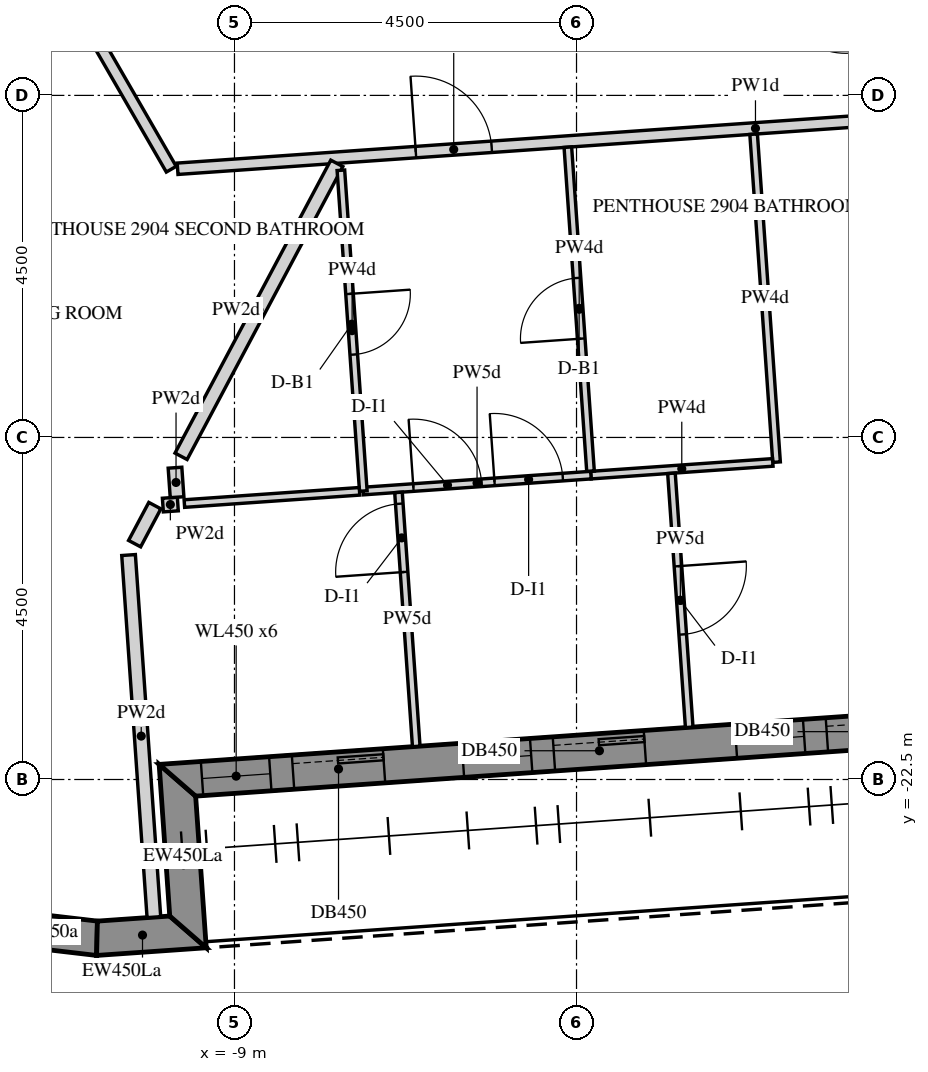
"""IFC4 building model, lengths in metres.
Left out: names, types, materials, properties, quantities, classifications, styles, units other than length and angle.
Written with IfcOpenShell. Run it as: python <this file> out.ifc"""

import sys

from ifc_helpers import new_model, si_unit, direction, frame, frame_2d, origin, place, context, subcontext, project, spatial, polyline, rectangle, outline, extrude, element, fill, save


model = new_model("IFC4")
c1 = context("Model", 3, precision=1e-05, world=origin(), true_north=direction((0.0, 1.0)))
c2 = subcontext(c1, "Body", "Model", "MODEL_VIEW")
j1 = project(units=[si_unit("LENGTHUNIT", "METRE"), si_unit("PLANEANGLEUNIT", "RADIAN")], contexts=[c1])
p1 = place(None, origin())
s1 = spatial("IfcSite", under=j1, at=p1, CompositionType="ELEMENT")
p2 = place(p1, origin())
s2 = spatial("IfcBuilding", under=s1, at=p2, CompositionType="ELEMENT")
p3 = place(p2, frame((0.0, 0.0, 372.9)))
s3 = spatial("IfcBuildingStorey", under=s2, at=p3, CompositionType="ELEMENT", Elevation=372.9)
p4 = place(p3, frame((-12.197, -24.427, -0.15), z_axis=(0.0, 0.0, 1.0), x_axis=(0.993227902261, -0.116182331575, 0.0)))
e1 = element("IfcWall", 1, at=p4, inside=s3, PredefinedType="SOLIDWALL", context=c2, shape_type="SweptSolid", body=[
    extrude(outline(polyline([(-0.042, -0.225), (1.418, -0.225), (1.376, 0.225), (0.042, 0.225), (-0.042, -0.225)])), origin(), (0.0, 0.0, 1.0), 3.55),
])
p5 = place(p3, frame((-10.809, -24.589, -0.15), z_axis=(0.0, 0.0, 1.0), x_axis=(0.997562933087, 0.069772448216, 0.0)))
e2 = element("IfcWall", 2, at=p5, inside=s3, PredefinedType="SOLIDWALL", context=c2, shape_type="SweptSolid", body=[
    extrude(outline(polyline([(-0.021, -0.225), (1.425, -0.225), (0.975, 0.225), (0.021, 0.225), (-0.021, -0.225)])), origin(), (0.0, 0.0, 1.0), 3.55),
])
p6 = place(p3, frame((-9.611, -24.505, -0.15), z_axis=(0.0, 0.0, 1.0), x_axis=(-0.069824268692, 0.99755930726, 0.0)))
e3 = element("IfcWall", 3, at=p6, inside=s3, PredefinedType="SOLIDWALL", context=c2, shape_type="SweptSolid", body=[
    extrude(outline(polyline([(-0.225, -0.225), (1.775, -0.225), (2.225, 0.225), (0.225, 0.225), (-0.225, -0.225)])), origin(), (0.0, 0.0, 1.0), 3.55),
])
p7 = place(p3, frame((-9.751, -22.51, -0.15), z_axis=(0.0, 0.0, 1.0), x_axis=(0.997564460173, 0.06975061147, 0.0)))
e4 = element("IfcWall", 4, at=p7, inside=s3, PredefinedType="SOLIDWALL", context=c2, shape_type="SweptSolid", body=[
    extrude(outline(polyline([(0.225, -0.225), (20.507, -0.225), (20.957, 0.225), (-0.225, 0.225), (0.225, -0.225)])), origin(), (0.0, 0.0, 1.0), 3.55),
])
p8 = place(p7, frame((0.325, 0.0, 1.05)))
e5 = element("IfcOpeningElement", 5, at=p8, cuts=e4, PredefinedType="OPENING", context=c2, shape_type="SweptSolid", body=[
    extrude(rectangle(XDim=0.9, YDim=1.5, at=frame_2d((0.45, 0.75))), frame((0.0, 0.235, 0.0), z_axis=(0.0, -1.0, 0.0), x_axis=(1.0, 0.0, 0.0)), (0.0, 0.0, 1.0), 0.47),
])
p9 = place(p7, frame((1.525, 0.0, 0.15)))
e6 = element("IfcOpeningElement", 6, at=p9, cuts=e4, PredefinedType="OPENING", context=c2, shape_type="SweptSolid", body=[
    extrude(rectangle(XDim=1.2, YDim=2.4, at=frame_2d((0.6, 1.2))), frame((0.0, 0.235, 0.0), z_axis=(0.0, -1.0, 0.0), x_axis=(1.0, 0.0, 0.0)), (0.0, 0.0, 1.0), 0.47),
])
p10 = place(p7, frame((3.766, 0.0, 1.05)))
e7 = element("IfcOpeningElement", 7, at=p10, cuts=e4, PredefinedType="OPENING", context=c2, shape_type="SweptSolid", body=[
    extrude(rectangle(XDim=0.9, YDim=1.5, at=frame_2d((0.45, 0.75))), frame((0.0, 0.235, 0.0), z_axis=(0.0, -1.0, 0.0), x_axis=(1.0, 0.0, 0.0)), (0.0, 0.0, 1.0), 0.47),
])
p11 = place(p7, frame((4.966, 0.0, 0.15)))
e8 = element("IfcOpeningElement", 8, at=p11, cuts=e4, PredefinedType="OPENING", context=c2, shape_type="SweptSolid", body=[
    extrude(rectangle(XDim=1.2, YDim=2.4, at=frame_2d((0.6, 1.2))), frame((0.0, 0.235, 0.0), z_axis=(0.0, -1.0, 0.0), x_axis=(1.0, 0.0, 0.0)), (0.0, 0.0, 1.0), 0.47),
])
p12 = place(p7, frame((7.366, 0.0, 1.05)))
e9 = element("IfcOpeningElement", 9, at=p12, cuts=e4, PredefinedType="OPENING", context=c2, shape_type="SweptSolid", body=[
    extrude(rectangle(XDim=0.9, YDim=1.5, at=frame_2d((0.45, 0.75))), frame((0.0, 0.235, 0.0), z_axis=(0.0, -1.0, 0.0), x_axis=(1.0, 0.0, 0.0)), (0.0, 0.0, 1.0), 0.47),
])
p13 = place(p7, frame((8.566, 0.0, 0.15)))
e10 = element("IfcOpeningElement", 10, at=p13, cuts=e4, PredefinedType="OPENING", context=c2, shape_type="SweptSolid", body=[
    extrude(rectangle(XDim=1.2, YDim=2.4, at=frame_2d((0.6, 1.2))), frame((0.0, 0.235, 0.0), z_axis=(0.0, -1.0, 0.0), x_axis=(1.0, 0.0, 0.0)), (0.0, 0.0, 1.0), 0.47),
])
p14 = place(p7, frame((10.966, 0.0, 1.05)))
e11 = element("IfcOpeningElement", 11, at=p14, cuts=e4, PredefinedType="OPENING", context=c2, shape_type="SweptSolid", body=[
    extrude(rectangle(XDim=0.9, YDim=1.5, at=frame_2d((0.45, 0.75))), frame((0.0, 0.235, 0.0), z_axis=(0.0, -1.0, 0.0), x_axis=(1.0, 0.0, 0.0)), (0.0, 0.0, 1.0), 0.47),
])
p15 = place(p7, frame((12.166, 0.0, 0.15)))
e12 = element("IfcOpeningElement", 12, at=p15, cuts=e4, PredefinedType="OPENING", context=c2, shape_type="SweptSolid", body=[
    extrude(rectangle(XDim=1.2, YDim=2.4, at=frame_2d((0.6, 1.2))), frame((0.0, 0.235, 0.0), z_axis=(0.0, -1.0, 0.0), x_axis=(1.0, 0.0, 0.0)), (0.0, 0.0, 1.0), 0.47),
])
p16 = place(p7, frame((14.566, 0.0, 1.05)))
e13 = element("IfcOpeningElement", 13, at=p16, cuts=e4, PredefinedType="OPENING", context=c2, shape_type="SweptSolid", body=[
    extrude(rectangle(XDim=0.9, YDim=1.5, at=frame_2d((0.45, 0.75))), frame((0.0, 0.235, 0.0), z_axis=(0.0, -1.0, 0.0), x_axis=(1.0, 0.0, 0.0)), (0.0, 0.0, 1.0), 0.47),
])
p17 = place(p7, frame((15.766, 0.0, 0.15)))
e14 = element("IfcOpeningElement", 14, at=p17, cuts=e4, PredefinedType="OPENING", context=c2, shape_type="SweptSolid", body=[
    extrude(rectangle(XDim=1.2, YDim=2.4, at=frame_2d((0.6, 1.2))), frame((0.0, 0.235, 0.0), z_axis=(0.0, -1.0, 0.0), x_axis=(1.0, 0.0, 0.0)), (0.0, 0.0, 1.0), 0.47),
])
p18 = place(p7, frame((18.007, 0.0, 1.05)))
e15 = element("IfcOpeningElement", 15, at=p18, cuts=e4, PredefinedType="OPENING", context=c2, shape_type="SweptSolid", body=[
    extrude(rectangle(XDim=0.9, YDim=1.5, at=frame_2d((0.45, 0.75))), frame((0.0, 0.235, 0.0), z_axis=(0.0, -1.0, 0.0), x_axis=(1.0, 0.0, 0.0)), (0.0, 0.0, 1.0), 0.47),
])
p19 = place(p7, frame((19.207, 0.0, 0.15)))
e16 = element("IfcOpeningElement", 16, at=p19, cuts=e4, PredefinedType="OPENING", context=c2, shape_type="SweptSolid", body=[
    extrude(rectangle(XDim=1.2, YDim=2.4, at=frame_2d((0.6, 1.2))), frame((0.0, 0.235, 0.0), z_axis=(0.0, -1.0, 0.0), x_axis=(1.0, 0.0, 0.0)), (0.0, 0.0, 1.0), 0.47),
])
p20 = place(p3, frame((-16.583, -2.777, 0.0), z_axis=(0.0, 0.0, 1.0), x_axis=(0.50000467473, -0.866022704811, 0.0)))
e17 = element("IfcWall", 17, at=p20, inside=s3, PredefinedType="PARTITIONING", context=c2, shape_type="SweptSolid", body=[
    extrude(rectangle(XDim=13.504, YDim=0.15, at=frame_2d((6.752, 0.0))), origin(), (0.0, 0.0, 1.0), 2.47),
])
p21 = place(p20, frame((0.925, 0.0, 0.0)))
e18 = element("IfcOpeningElement", 18, at=p21, cuts=e17, PredefinedType="OPENING", context=c2, shape_type="SweptSolid", body=[
    extrude(rectangle(XDim=1.0, YDim=2.1, at=frame_2d((0.5, 1.05))), frame((0.0, 0.085, 0.0), z_axis=(0.0, -1.0, 0.0), x_axis=(1.0, 0.0, 0.0)), (0.0, 0.0, 1.0), 0.17),
])
p22 = place(p3, frame((-9.749, -14.465, 0.0), z_axis=(0.0, 0.0, 1.0), x_axis=(0.997564252773, 0.069753577612, 0.0)))
e19 = element("IfcWall", 19, at=p22, inside=s3, PredefinedType="PARTITIONING", context=c2, shape_type="SweptSolid", body=[
    extrude(rectangle(XDim=15.243, YDim=0.15, at=frame_2d((7.621, 0.0))), origin(), (0.0, 0.0, 1.0), 2.47),
])
p23 = place(p22, frame((3.142, 0.0, 0.0)))
e20 = element("IfcOpeningElement", 20, at=p23, cuts=e19, PredefinedType="OPENING", context=c2, shape_type="SweptSolid", body=[
    extrude(rectangle(XDim=1.0, YDim=2.1, at=frame_2d((0.5, 1.05))), frame((0.0, 0.085, 0.0), z_axis=(0.0, -1.0, 0.0), x_axis=(1.0, 0.0, 0.0)), (0.0, 0.0, 1.0), 0.17),
])
p24 = place(p3, frame((-10.06, -24.311, 0.0), z_axis=(0.0, 0.0, 1.0), x_axis=(-0.069731958306, 0.997565764244, 0.0)))
e21 = element("IfcWall", 21, at=p24, inside=s3, PredefinedType="PARTITIONING", context=c2, shape_type="SweptSolid", body=[
    extrude(rectangle(XDim=4.776, YDim=0.18, at=frame_2d((2.388, 0.0))), origin(), (0.0, 0.0, 1.0), 2.47),
])
p25 = place(p3, frame((-10.314, -19.397, 0.0), z_axis=(0.0, 0.0, 1.0), x_axis=(0.469648701082, 0.882853383961, 0.0)))
e22 = element("IfcWall", 22, at=p25, inside=s3, PredefinedType="PARTITIONING", context=c2, shape_type="SweptSolid", body=[
    extrude(rectangle(XDim=0.567, YDim=0.18, at=frame_2d((0.283, 0.0))), origin(), (0.0, 0.0, 1.0), 2.47),
])
p26 = place(p3, frame((-9.942, -18.889, 0.0), z_axis=(0.0, 0.0, 1.0), x_axis=(0.997589087128, 0.069397501713, 0.0)))
e23 = element("IfcWall", 23, at=p26, inside=s3, PredefinedType="PARTITIONING", context=c2, shape_type="SweptSolid", body=[
    extrude(rectangle(XDim=0.197, YDim=0.18, at=frame_2d((0.099, 0.0))), origin(), (0.0, 0.0, 1.0), 2.47),
])
p27 = place(p3, frame((-9.755, -18.786, 0.0), z_axis=(0.0, 0.0, 1.0), x_axis=(-0.070266142985, 0.997528279875, 0.0)))
e24 = element("IfcWall", 24, at=p27, inside=s3, PredefinedType="PARTITIONING", context=c2, shape_type="SweptSolid", body=[
    extrude(rectangle(XDim=0.389, YDim=0.18, at=frame_2d((0.195, 0.0))), origin(), (0.0, 0.0, 1.0), 2.47),
])
p28 = place(p3, frame((-9.703, -18.248, 0.0), z_axis=(0.0, 0.0, 1.0), x_axis=(0.469490526632, 0.882937509342, 0.0)))
e25 = element("IfcWall", 25, at=p28, inside=s3, PredefinedType="PARTITIONING", context=c2, shape_type="SweptSolid", body=[
    extrude(rectangle(XDim=4.365, YDim=0.18, at=frame_2d((2.183, 0.0))), origin(), (0.0, 0.0, 1.0), 2.47),
])
p29 = place(p3, frame((-2.17, -14.01, 0.0), z_axis=(0.0, 0.0, 1.0), x_axis=(0.069770707097, -0.997563054865, 0.0)))
e26 = element("IfcWall", 26, at=p29, inside=s3, PredefinedType="PARTITIONING", context=c2, shape_type="SweptSolid", body=[
    extrude(rectangle(XDim=4.325, YDim=0.1, at=frame_2d((2.163, 0.0))), origin(), (0.0, 0.0, 1.0), 2.47),
])
p30 = place(p3, frame((-1.918, -18.328, 0.0), z_axis=(0.0, 0.0, 1.0), x_axis=(-0.997561942506, -0.06978660948, 0.0)))
e27 = element("IfcWall", 27, at=p30, inside=s3, PredefinedType="PARTITIONING", context=c2, shape_type="SweptSolid", body=[
    extrude(rectangle(XDim=2.4, YDim=0.1, at=frame_2d((1.2, 0.0))), origin(), (0.0, 0.0, 1.0), 2.47),
])
p31 = place(p3, frame((-3.251, -18.472, 0.0), z_axis=(0.0, 0.0, 1.0), x_axis=(0.069739930095, -0.997565206967, 0.0)))
e28 = element("IfcWall", 28, at=p31, inside=s3, PredefinedType="PARTITIONING", context=c2, shape_type="SweptSolid", body=[
    extrude(rectangle(XDim=3.35, YDim=0.1, at=frame_2d((1.675, 0.0))), origin(), (0.0, 0.0, 1.0), 2.47),
])
p32 = place(p31, frame((1.225, 0.0, 0.0)))
e29 = element("IfcOpeningElement", 29, at=p32, cuts=e28, PredefinedType="OPENING", context=c2, shape_type="SweptSolid", body=[
    extrude(rectangle(XDim=0.9, YDim=2.1, at=frame_2d((0.45, 1.05))), frame((0.0, 0.06, 0.0), z_axis=(0.0, -1.0, 0.0), x_axis=(1.0, 0.0, 0.0)), (0.0, 0.0, 1.0), 0.12),
])
p33 = place(p3, frame((-4.316, -18.446, 0.0), z_axis=(0.0, 0.0, 1.0), x_axis=(-0.069785937212, 0.997561989536, 0.0)))
e30 = element("IfcWall", 30, at=p33, inside=s3, PredefinedType="PARTITIONING", context=c2, shape_type="SweptSolid", body=[
    extrude(rectangle(XDim=4.275, YDim=0.1, at=frame_2d((2.138, 0.0))), origin(), (0.0, 0.0, 1.0), 2.47),
])
p34 = place(p33, frame((1.75, 0.0, 0.0)))
e31 = element("IfcOpeningElement", 31, at=p34, cuts=e30, PredefinedType="OPENING", context=c2, shape_type="SweptSolid", body=[
    extrude(rectangle(XDim=0.8, YDim=2.1, at=frame_2d((0.4, 1.05))), frame((0.0, 0.06, 0.0), z_axis=(0.0, -1.0, 0.0), x_axis=(1.0, 0.0, 0.0)), (0.0, 0.0, 1.0), 0.12),
])
p35 = place(p3, frame((-7.307, -18.705, 0.0), z_axis=(0.0, 0.0, 1.0), x_axis=(0.997565643132, 0.069733690876, 0.0)))
e32 = element("IfcWall", 32, at=p35, inside=s3, PredefinedType="PARTITIONING", context=c2, shape_type="SweptSolid", body=[
    extrude(rectangle(XDim=3.004, YDim=0.1, at=frame_2d((1.502, 0.0))), origin(), (0.0, 0.0, 1.0), 2.47),
])
p36 = place(p35, frame((0.662, 0.0, 0.0)))
e33 = element("IfcOpeningElement", 33, at=p36, cuts=e32, PredefinedType="OPENING", context=c2, shape_type="SweptSolid", body=[
    extrude(rectangle(XDim=0.9, YDim=2.1, at=frame_2d((0.45, 1.05))), frame((0.0, 0.06, 0.0), z_axis=(0.0, -1.0, 0.0), x_axis=(1.0, 0.0, 0.0)), (0.0, 0.0, 1.0), 0.12),
])
p37 = place(p35, frame((1.732, 0.0, 0.0)))
e34 = element("IfcOpeningElement", 34, at=p37, cuts=e32, PredefinedType="OPENING", context=c2, shape_type="SweptSolid", body=[
    extrude(rectangle(XDim=0.9, YDim=2.1, at=frame_2d((0.45, 1.05))), frame((0.0, 0.06, 0.0), z_axis=(0.0, -1.0, 0.0), x_axis=(1.0, 0.0, 0.0)), (0.0, 0.0, 1.0), 0.12),
])
p38 = place(p3, frame((-7.6, -14.485, 0.0), z_axis=(0.0, 0.0, 1.0), x_axis=(0.069778585231, -0.997562503828, 0.0)))
e35 = element("IfcWall", 35, at=p38, inside=s3, PredefinedType="PARTITIONING", context=c2, shape_type="SweptSolid", body=[
    extrude(rectangle(XDim=4.23, YDim=0.1, at=frame_2d((2.115, 0.0))), origin(), (0.0, 0.0, 1.0), 2.47),
])
p39 = place(p38, frame((1.63, 0.0, 0.0)))
e36 = element("IfcOpeningElement", 36, at=p39, cuts=e35, PredefinedType="OPENING", context=c2, shape_type="SweptSolid", body=[
    extrude(rectangle(XDim=0.8, YDim=2.1, at=frame_2d((0.4, 1.05))), frame((0.0, 0.06, 0.0), z_axis=(0.0, -1.0, 0.0), x_axis=(1.0, 0.0, 0.0)), (0.0, 0.0, 1.0), 0.12),
])
p40 = place(p3, frame((-6.609, -22.065, 0.0), z_axis=(0.0, 0.0, 1.0), x_axis=(-0.06974500028, 0.997564852496, 0.0)))
e37 = element("IfcWall", 37, at=p40, inside=s3, PredefinedType="PARTITIONING", context=c2, shape_type="SweptSolid", body=[
    extrude(rectangle(XDim=3.35, YDim=0.1, at=frame_2d((1.675, 0.0))), origin(), (0.0, 0.0, 1.0), 2.47),
])
p41 = place(p40, frame((2.3, 0.0, 0.0)))
e38 = element("IfcOpeningElement", 38, at=p41, cuts=e37, PredefinedType="OPENING", context=c2, shape_type="SweptSolid", body=[
    extrude(rectangle(XDim=0.9, YDim=2.1, at=frame_2d((0.45, 1.05))), frame((0.0, 0.06, 0.0), z_axis=(0.0, -1.0, 0.0), x_axis=(1.0, 0.0, 0.0)), (0.0, 0.0, 1.0), 0.12),
])
p42 = place(p3, frame((-7.355, -18.708, 0.0), z_axis=(0.0, 0.0, 1.0), x_axis=(-0.997556979038, -0.069857523376, 0.0)))
e39 = element("IfcWall", 39, at=p42, inside=s3, PredefinedType="PARTITIONING", context=c2, shape_type="SweptSolid", body=[
    extrude(rectangle(XDim=2.31, YDim=0.1, at=frame_2d((1.155, 0.0))), origin(), (0.0, 0.0, 1.0), 2.47),
])
p43 = place(p8, frame((0.0, 0.155, 0.0)))
e40 = element("IfcWindow", 40, at=p43, inside=s3, PartitioningType="SINGLE_PANEL", PredefinedType="WINDOW", context=c2, shape_type="SweptSolid", body=[
    extrude(rectangle(XDim=0.9, YDim=1.5, at=frame_2d((0.45, 0.75))), frame((0.0, 0.03, 0.0), z_axis=(0.0, -1.0, 0.0), x_axis=(1.0, 0.0, 0.0)), (0.0, 0.0, 1.0), 0.06),
])
fill(e5, e40)
p44 = place(p9, frame((0.0, 0.15, 0.0)))
e41 = element("IfcDoor", 41, at=p44, inside=s3, OperationType="SLIDING_TO_LEFT", PredefinedType="DOOR", context=c2, shape_type="SweptSolid", body=[
    extrude(rectangle(XDim=1.2, YDim=2.4, at=frame_2d((0.6, 1.2))), frame((0.0, 0.025, 0.0), z_axis=(0.0, -1.0, 0.0), x_axis=(1.0, 0.0, 0.0)), (0.0, 0.0, 1.0), 0.05),
])
fill(e6, e41)
p45 = place(p10, frame((0.0, 0.155, 0.0)))
e42 = element("IfcWindow", 42, at=p45, inside=s3, PartitioningType="SINGLE_PANEL", PredefinedType="WINDOW", context=c2, shape_type="SweptSolid", body=[
    extrude(rectangle(XDim=0.9, YDim=1.5, at=frame_2d((0.45, 0.75))), frame((0.0, 0.03, 0.0), z_axis=(0.0, -1.0, 0.0), x_axis=(1.0, 0.0, 0.0)), (0.0, 0.0, 1.0), 0.06),
])
fill(e7, e42)
p46 = place(p11, frame((0.0, 0.15, 0.0)))
e43 = element("IfcDoor", 43, at=p46, inside=s3, OperationType="SLIDING_TO_LEFT", PredefinedType="DOOR", context=c2, shape_type="SweptSolid", body=[
    extrude(rectangle(XDim=1.2, YDim=2.4, at=frame_2d((0.6, 1.2))), frame((0.0, 0.025, 0.0), z_axis=(0.0, -1.0, 0.0), x_axis=(1.0, 0.0, 0.0)), (0.0, 0.0, 1.0), 0.05),
])
fill(e8, e43)
p47 = place(p12, frame((0.0, 0.155, 0.0)))
e44 = element("IfcWindow", 44, at=p47, inside=s3, PartitioningType="SINGLE_PANEL", PredefinedType="WINDOW", context=c2, shape_type="SweptSolid", body=[
    extrude(rectangle(XDim=0.9, YDim=1.5, at=frame_2d((0.45, 0.75))), frame((0.0, 0.03, 0.0), z_axis=(0.0, -1.0, 0.0), x_axis=(1.0, 0.0, 0.0)), (0.0, 0.0, 1.0), 0.06),
])
fill(e9, e44)
p48 = place(p13, frame((0.0, 0.15, 0.0)))
e45 = element("IfcDoor", 45, at=p48, inside=s3, OperationType="SLIDING_TO_LEFT", PredefinedType="DOOR", context=c2, shape_type="SweptSolid", body=[
    extrude(rectangle(XDim=1.2, YDim=2.4, at=frame_2d((0.6, 1.2))), frame((0.0, 0.025, 0.0), z_axis=(0.0, -1.0, 0.0), x_axis=(1.0, 0.0, 0.0)), (0.0, 0.0, 1.0), 0.05),
])
fill(e10, e45)
p49 = place(p23, origin())
e46 = element("IfcDoor", 46, at=p49, inside=s3, OperationType="SINGLE_SWING_RIGHT", PredefinedType="DOOR", context=c2, shape_type="SweptSolid", body=[
    extrude(rectangle(XDim=1.0, YDim=2.1, at=frame_2d((0.5, 1.05))), frame((0.0, 0.025, 0.0), z_axis=(0.0, -1.0, 0.0), x_axis=(1.0, 0.0, 0.0)), (0.0, 0.0, 1.0), 0.05),
])
fill(e20, e46)
p50 = place(p34, origin())
e47 = element("IfcDoor", 47, at=p50, inside=s3, OperationType="SINGLE_SWING_LEFT", PredefinedType="DOOR", context=c2, shape_type="SweptSolid", body=[
    extrude(rectangle(XDim=0.8, YDim=2.1, at=frame_2d((0.4, 1.05))), frame((0.0, 0.025, 0.0), z_axis=(0.0, -1.0, 0.0), x_axis=(1.0, 0.0, 0.0)), (0.0, 0.0, 1.0), 0.05),
])
fill(e31, e47)
p51 = place(p36, origin())
e48 = element("IfcDoor", 48, at=p51, inside=s3, OperationType="SINGLE_SWING_LEFT", PredefinedType="DOOR", context=c2, shape_type="SweptSolid", body=[
    extrude(rectangle(XDim=0.9, YDim=2.1, at=frame_2d((0.45, 1.05))), frame((0.0, 0.025, 0.0), z_axis=(0.0, -1.0, 0.0), x_axis=(1.0, 0.0, 0.0)), (0.0, 0.0, 1.0), 0.05),
])
fill(e33, e48)
p52 = place(p41, origin())
e49 = element("IfcDoor", 49, at=p52, inside=s3, OperationType="SINGLE_SWING_RIGHT", PredefinedType="DOOR", context=c2, shape_type="SweptSolid", body=[
    extrude(rectangle(XDim=0.9, YDim=2.1, at=frame_2d((0.45, 1.05))), frame((0.0, 0.025, 0.0), z_axis=(0.0, -1.0, 0.0), x_axis=(1.0, 0.0, 0.0)), (0.0, 0.0, 1.0), 0.05),
])
fill(e38, e49)
p53 = place(p37, origin())
e50 = element("IfcDoor", 50, at=p53, inside=s3, OperationType="SINGLE_SWING_LEFT", PredefinedType="DOOR", context=c2, shape_type="SweptSolid", body=[
    extrude(rectangle(XDim=0.9, YDim=2.1, at=frame_2d((0.45, 1.05))), frame((0.0, 0.025, 0.0), z_axis=(0.0, -1.0, 0.0), x_axis=(1.0, 0.0, 0.0)), (0.0, 0.0, 1.0), 0.05),
])
fill(e34, e50)
p54 = place(p39, origin())
e51 = element("IfcDoor", 51, at=p54, inside=s3, OperationType="SINGLE_SWING_RIGHT", PredefinedType="DOOR", context=c2, shape_type="SweptSolid", body=[
    extrude(rectangle(XDim=0.8, YDim=2.1, at=frame_2d((0.4, 1.05))), frame((0.0, 0.025, 0.0), z_axis=(0.0, -1.0, 0.0), x_axis=(1.0, 0.0, 0.0)), (0.0, 0.0, 1.0), 0.05),
])
fill(e36, e51)
p55 = place(p32, origin())
e52 = element("IfcDoor", 52, at=p55, inside=s3, OperationType="SINGLE_SWING_RIGHT", PredefinedType="DOOR", context=c2, shape_type="SweptSolid", body=[
    extrude(rectangle(XDim=0.9, YDim=2.1, at=frame_2d((0.45, 1.05))), frame((0.0, 0.025, 0.0), z_axis=(0.0, -1.0, 0.0), x_axis=(1.0, 0.0, 0.0)), (0.0, 0.0, 1.0), 0.05),
])
fill(e29, e52)
save(model, sys.argv[1])
